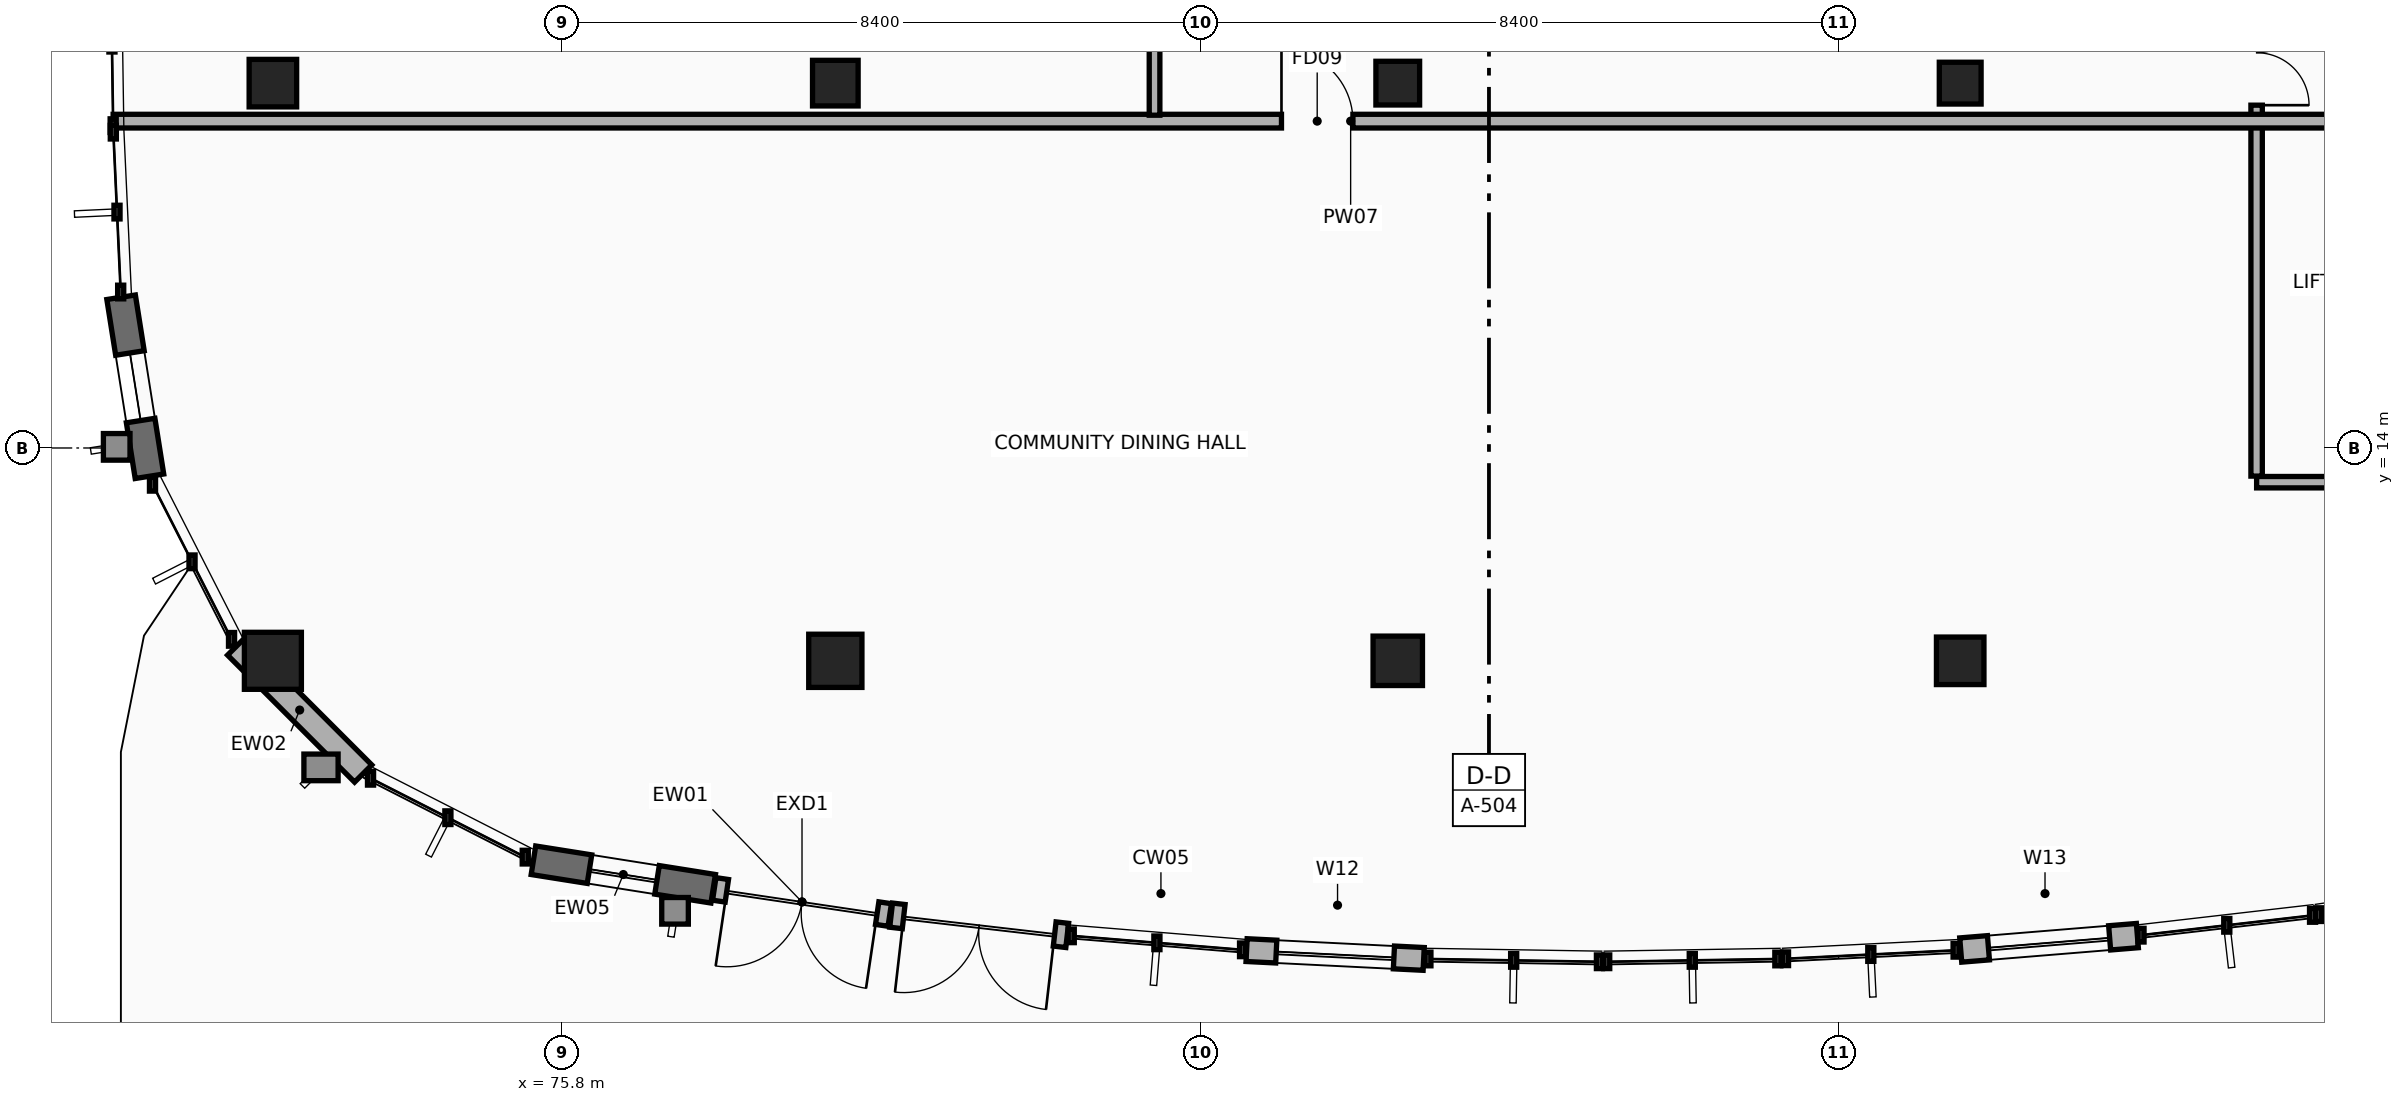
"""IFC4 building model, lengths in metres.
Left out: names, types, materials, properties, quantities, classifications, styles, units other than length and angle.
Written with IfcOpenShell. Run it as: python <this file> out.ifc"""

import sys

from ifc_helpers import new_model, si_unit, direction, frame, frame_2d, origin, origin_2d, place, context, subcontext, project, spatial, rectangle, extrude, element, fill, save


model = new_model("IFC4")
c1 = context("Model", 3, precision=1e-05, world=origin(), true_north=direction((0.0, 1.0)))
c2 = subcontext(c1, "Body", "Model", "MODEL_VIEW")
j1 = project(units=[si_unit("LENGTHUNIT", "METRE"), si_unit("PLANEANGLEUNIT", "RADIAN")], contexts=[c1])
p1 = place(None, origin())
s1 = spatial("IfcSite", under=j1, at=p1, CompositionType="ELEMENT")
p2 = place(p1, origin())
s2 = spatial("IfcBuilding", under=s1, at=p2, CompositionType="ELEMENT")
p3 = place(p2, origin())
s3 = spatial("IfcBuildingStorey", under=s2, at=p3, CompositionType="ELEMENT", Elevation=0.0)
p4 = place(p3, frame((72.0, 11.2, 0.0), z_axis=(0.0, 0.0, 1.0), x_axis=(1.0, 0.0, 0.0)))
e1 = element("IfcColumn", 1, at=p4, inside=s3, PredefinedType="COLUMN", context=c2, shape_type="SweptSolid", body=[
    extrude(rectangle(XDim=0.75, YDim=0.75, at=origin_2d()), origin(), (0.0, 0.0, 1.0), 4.8),
])
p5 = place(p3, frame((72.0, 18.8, 0.0), z_axis=(0.0, 0.0, 1.0), x_axis=(1.0, 0.0, 0.0)))
e2 = element("IfcColumn", 2, at=p5, inside=s3, PredefinedType="COLUMN", context=c2, shape_type="SweptSolid", body=[
    extrude(rectangle(XDim=0.625, YDim=0.625, at=origin_2d()), origin(), (0.0, 0.0, 1.0), 4.8),
])
p6 = place(p3, frame((79.4, 11.2, 0.0), z_axis=(0.0, 0.0, 1.0), x_axis=(1.0, 0.0, 0.0)))
e3 = element("IfcColumn", 3, at=p6, inside=s3, PredefinedType="COLUMN", context=c2, shape_type="SweptSolid", body=[
    extrude(rectangle(XDim=0.7, YDim=0.7, at=origin_2d()), origin(), (0.0, 0.0, 1.0), 4.8),
])
p7 = place(p3, frame((79.4, 18.8, 0.0), z_axis=(0.0, 0.0, 1.0), x_axis=(1.0, 0.0, 0.0)))
e4 = element("IfcColumn", 4, at=p7, inside=s3, PredefinedType="COLUMN", context=c2, shape_type="SweptSolid", body=[
    extrude(rectangle(XDim=0.6, YDim=0.6, at=origin_2d()), origin(), (0.0, 0.0, 1.0), 4.8),
])
p8 = place(p3, frame((86.8, 11.2, 0.0), z_axis=(0.0, 0.0, 1.0), x_axis=(1.0, 0.0, 0.0)))
e5 = element("IfcColumn", 5, at=p8, inside=s3, PredefinedType="COLUMN", context=c2, shape_type="SweptSolid", body=[
    extrude(rectangle(XDim=0.65, YDim=0.65, at=origin_2d()), origin(), (0.0, 0.0, 1.0), 4.8),
])
p9 = place(p3, frame((86.8, 18.8, 0.0), z_axis=(0.0, 0.0, 1.0), x_axis=(1.0, 0.0, 0.0)))
e6 = element("IfcColumn", 6, at=p9, inside=s3, PredefinedType="COLUMN", context=c2, shape_type="SweptSolid", body=[
    extrude(rectangle(XDim=0.575, YDim=0.575, at=origin_2d()), origin(), (0.0, 0.0, 1.0), 4.8),
])
p10 = place(p3, frame((94.2, 11.2, 0.0), z_axis=(0.0, 0.0, 1.0), x_axis=(1.0, 0.0, 0.0)))
e7 = element("IfcColumn", 7, at=p10, inside=s3, PredefinedType="COLUMN", context=c2, shape_type="SweptSolid", body=[
    extrude(rectangle(XDim=0.625, YDim=0.625, at=origin_2d()), origin(), (0.0, 0.0, 1.0), 4.8),
])
p11 = place(p3, frame((94.2, 18.8, 0.0), z_axis=(0.0, 0.0, 1.0), x_axis=(1.0, 0.0, 0.0)))
e8 = element("IfcColumn", 8, at=p11, inside=s3, PredefinedType="COLUMN", context=c2, shape_type="SweptSolid", body=[
    extrude(rectangle(XDim=0.55, YDim=0.55, at=origin_2d()), origin(), (0.0, 0.0, 1.0), 4.8),
])
p12 = place(p3, frame((80.116, 7.856, 0.0), z_axis=(0.0, 0.0, 1.0), x_axis=(-0.98914554884, 0.1469390459, 0.0)))
e9 = element("IfcWall", 9, at=p12, inside=s3, PredefinedType="STANDARD", context=c2, shape_type="SweptSolid", body=[
    extrude(rectangle(XDim=2.334, YDim=0.3, at=frame_2d((1.167, 0.0))), origin(), (0.0, 0.0, 1.0), 4.512),
])
p13 = place(p12, frame((0.167, 0.0, 0.0)))
e10 = element("IfcOpeningElement", 10, at=p13, cuts=e9, PredefinedType="OPENING", context=c2, shape_type="SweptSolid", body=[
    extrude(rectangle(XDim=2.0, YDim=2.4, at=frame_2d((1.0, 1.2))), frame((0.0, 0.16, 0.0), z_axis=(0.0, -1.0, 0.0), x_axis=(1.0, 0.0, 0.0)), (0.0, 0.0, 1.0), 0.32),
])
p14 = place(p3, frame((82.451, 7.587, 0.0), z_axis=(0.0, 0.0, 1.0), x_axis=(-0.993420850358, 0.114520801927, 0.0)))
e11 = element("IfcWall", 11, at=p14, inside=s3, PredefinedType="STANDARD", context=c2, shape_type="SweptSolid", body=[
    extrude(rectangle(XDim=2.332, YDim=0.32, at=frame_2d((1.166, 0.0))), origin(), (0.0, 0.0, 1.0), 4.512),
])
p15 = place(p14, frame((0.166, 0.0, 0.0)))
e12 = element("IfcOpeningElement", 12, at=p15, cuts=e11, PredefinedType="OPENING", context=c2, shape_type="SweptSolid", body=[
    extrude(rectangle(XDim=2.0, YDim=2.4, at=frame_2d((1.0, 1.2))), frame((0.0, 0.17, 0.0), z_axis=(0.0, -1.0, 0.0), x_axis=(1.0, 0.0, 0.0)), (0.0, 0.0, 1.0), 0.34),
])
p16 = place(p3, frame((87.141, 7.278, 0.0), z_axis=(0.0, 0.0, 1.0), x_axis=(-0.998763795086, 0.049707963398, 0.0)))
e13 = element("IfcWall", 13, at=p16, inside=s3, PredefinedType="STANDARD", context=c2, shape_type="SweptSolid", body=[
    extrude(rectangle(XDim=2.333, YDim=0.3, at=frame_2d((1.167, 0.0))), origin(), (0.0, 0.0, 1.0), 4.512),
])
p17 = place(p16, frame((0.392, 0.0, 0.9)))
e14 = element("IfcOpeningElement", 14, at=p17, cuts=e13, PredefinedType="OPENING", context=c2, shape_type="SweptSolid", body=[
    extrude(rectangle(XDim=1.55, YDim=1.65, at=frame_2d((0.775, 0.825))), frame((0.0, 0.16, 0.0), z_axis=(0.0, -1.0, 0.0), x_axis=(1.0, 0.0, 0.0)), (0.0, 0.0, 1.0), 0.32),
])
p18 = place(p3, frame((96.531, 7.585, 0.0), z_axis=(0.0, 0.0, 1.0), x_axis=(-0.996676640199, -0.081459651862, 0.0)))
e15 = element("IfcWall", 15, at=p18, inside=s3, PredefinedType="STANDARD", context=c2, shape_type="SweptSolid", body=[
    extrude(rectangle(XDim=2.332, YDim=0.32, at=frame_2d((1.166, 0.0))), origin(), (0.0, 0.0, 1.0), 4.512),
])
p19 = place(p18, frame((0.366, 0.0, 0.9)))
e16 = element("IfcOpeningElement", 16, at=p19, cuts=e15, PredefinedType="OPENING", context=c2, shape_type="SweptSolid", body=[
    extrude(rectangle(XDim=1.6, YDim=1.5, at=frame_2d((0.8, 0.75))), frame((0.0, 0.17, 0.0), z_axis=(0.0, -1.0, 0.0), x_axis=(1.0, 0.0, 0.0)), (0.0, 0.0, 1.0), 0.34),
])
p20 = place(p3, frame((70.376, 13.628, 0.0), z_axis=(0.0, 0.0, 1.0), x_axis=(-0.156456808689, 0.98768480145, 0.0)))
e17 = element("IfcWall", 17, at=p20, inside=s3, PredefinedType="STANDARD", context=c2, shape_type="SweptSolid", body=[
    extrude(rectangle(XDim=2.384, YDim=0.38, at=frame_2d((1.192, 0.0))), origin(), (0.0, 0.0, 1.0), 4.512),
])
p21 = place(p20, frame((0.742, 0.0, 0.9)))
e18 = element("IfcOpeningElement", 18, at=p21, cuts=e17, PredefinedType="OPENING", context=c2, shape_type="SweptSolid", body=[
    extrude(rectangle(XDim=0.9, YDim=1.2, at=frame_2d((0.45, 0.6))), frame((0.0, 0.2, 0.0), z_axis=(0.0, -1.0, 0.0), x_axis=(1.0, 0.0, 0.0)), (0.0, 0.0, 1.0), 0.4),
])
p22 = place(p3, frame((73.188, 9.717, 0.0), z_axis=(0.0, 0.0, 1.0), x_axis=(-0.707106781187, 0.707106781187, 0.0)))
e19 = element("IfcWall", 19, at=p22, inside=s3, PredefinedType="STANDARD", context=c2, shape_type="SweptSolid", body=[
    extrude(rectangle(XDim=2.363, YDim=0.32, at=frame_2d((1.182, 0.0))), origin(), (0.0, 0.0, 1.0), 4.03),
])
p23 = place(p3, frame((77.793, 8.201, 0.0), z_axis=(0.0, 0.0, 1.0), x_axis=(-0.987661073589, 0.15660652514, 0.0)))
e20 = element("IfcWall", 20, at=p23, inside=s3, PredefinedType="STANDARD", context=c2, shape_type="SweptSolid", body=[
    extrude(rectangle(XDim=2.395, YDim=0.38, at=frame_2d((1.197, 0.0))), origin(), (0.0, 0.0, 1.0), 4.512),
])
p24 = place(p23, frame((0.748, 0.0, 0.9)))
e21 = element("IfcOpeningElement", 21, at=p24, cuts=e20, PredefinedType="OPENING", context=c2, shape_type="SweptSolid", body=[
    extrude(rectangle(XDim=0.9, YDim=1.2, at=frame_2d((0.45, 0.6))), frame((0.0, 0.2, 0.0), z_axis=(0.0, -1.0, 0.0), x_axis=(1.0, 0.0, 0.0)), (0.0, 0.0, 1.0), 0.4),
])
p25 = place(p3, frame((98.1, 13.55, 0.0), z_axis=(0.0, 0.0, 1.0), x_axis=(1.0, 0.0, 0.0)))
e22 = element("IfcWall", 22, at=p25, inside=s3, PredefinedType="PARTITIONING", context=c2, shape_type="SweptSolid", body=[
    extrude(rectangle(XDim=4.365, YDim=0.15, at=frame_2d((2.183, 0.0))), origin(), (0.0, 0.0, 1.0), 3.93),
])
p26 = place(p3, frame((98.1, 24.77, 0.0), z_axis=(0.0, 0.0, 1.0), x_axis=(0.0, -1.0, 0.0)))
e23 = element("IfcWall", 23, at=p26, inside=s3, PredefinedType="PARTITIONING", context=c2, shape_type="SweptSolid", body=[
    extrude(rectangle(XDim=11.14, YDim=0.15, at=frame_2d((5.57, 0.0))), origin(), (0.0, 0.0, 1.0), 4.117),
])
p27 = place(p26, frame((4.88, 0.0, 0.0)))
e24 = element("IfcOpeningElement", 24, at=p27, cuts=e23, PredefinedType="OPENING", context=c2, shape_type="SweptSolid", body=[
    extrude(rectangle(XDim=1.38, YDim=2.2, at=frame_2d((0.69, 1.1))), frame((0.0, 0.085, 0.0), z_axis=(0.0, -1.0, 0.0), x_axis=(1.0, 0.0, 0.0)), (0.0, 0.0, 1.0), 0.17),
])
p28 = place(p3, frame((69.898, 18.3, 0.0), z_axis=(0.0, 0.0, 1.0), x_axis=(1.0, 0.0, 0.0)))
e25 = element("IfcWall", 25, at=p28, inside=s3, PredefinedType="PARTITIONING", context=c2, shape_type="SweptSolid", body=[
    extrude(rectangle(XDim=32.564, YDim=0.18, at=frame_2d((16.282, 0.0))), origin(), (0.0, 0.0, 1.0), 3.93),
])
p29 = place(p28, frame((15.372, 0.0, 0.0)))
e26 = element("IfcOpeningElement", 26, at=p29, cuts=e25, PredefinedType="OPENING", context=c2, shape_type="SweptSolid", body=[
    extrude(rectangle(XDim=0.94, YDim=2.1, at=frame_2d((0.47, 1.05))), frame((0.0, 0.1, 0.0), z_axis=(0.0, -1.0, 0.0), x_axis=(1.0, 0.0, 0.0)), (0.0, 0.0, 1.0), 0.2),
])
p30 = place(p3, frame((83.6, 18.378, 0.0), z_axis=(0.0, 0.0, 1.0), x_axis=(0.0, 1.0, 0.0)))
e27 = element("IfcWall", 27, at=p30, inside=s3, PredefinedType="PARTITIONING", context=c2, shape_type="SweptSolid", body=[
    extrude(rectangle(XDim=14.781, YDim=0.14, at=frame_2d((7.391, 0.0))), origin(), (0.0, 0.0, 1.0), 4.112),
])
p31 = place(p13, origin())
e28 = element("IfcDoor", 28, at=p31, inside=s3, OperationType="DOUBLE_DOOR_SINGLE_SWING", PredefinedType="DOOR", context=c2, shape_type="SweptSolid", body=[
    extrude(rectangle(XDim=2.0, YDim=2.4, at=frame_2d((1.0, 1.2))), frame((0.0, 0.025, 0.0), z_axis=(0.0, -1.0, 0.0), x_axis=(1.0, 0.0, 0.0)), (0.0, 0.0, 1.0), 0.05),
])
fill(e10, e28)
p32 = place(p15, origin())
e29 = element("IfcDoor", 29, at=p32, inside=s3, OperationType="DOUBLE_DOOR_SINGLE_SWING", PredefinedType="DOOR", context=c2, shape_type="SweptSolid", body=[
    extrude(rectangle(XDim=2.0, YDim=2.4, at=frame_2d((1.0, 1.2))), frame((0.0, 0.025, 0.0), z_axis=(0.0, -1.0, 0.0), x_axis=(1.0, 0.0, 0.0)), (0.0, 0.0, 1.0), 0.05),
])
fill(e12, e29)
p33 = place(p17, origin())
e30 = element("IfcWindow", 30, at=p33, inside=s3, PartitioningType="SINGLE_PANEL", PredefinedType="WINDOW", context=c2, shape_type="SweptSolid", body=[
    extrude(rectangle(XDim=1.55, YDim=1.65, at=frame_2d((0.775, 0.825))), frame((0.0, 0.03, 0.0), z_axis=(0.0, -1.0, 0.0), x_axis=(1.0, 0.0, 0.0)), (0.0, 0.0, 1.0), 0.06),
])
fill(e14, e30)
p34 = place(p19, origin())
e31 = element("IfcWindow", 31, at=p34, inside=s3, PartitioningType="SINGLE_PANEL", PredefinedType="WINDOW", context=c2, shape_type="SweptSolid", body=[
    extrude(rectangle(XDim=1.6, YDim=1.5, at=frame_2d((0.8, 0.75))), frame((0.0, 0.03, 0.0), z_axis=(0.0, -1.0, 0.0), x_axis=(1.0, 0.0, 0.0)), (0.0, 0.0, 1.0), 0.06),
])
fill(e16, e31)
p35 = place(p21, origin())
e32 = element("IfcWindow", 32, at=p35, inside=s3, PartitioningType="SINGLE_PANEL", PredefinedType="WINDOW", context=c2, shape_type="SweptSolid", body=[
    extrude(rectangle(XDim=0.9, YDim=1.2, at=frame_2d((0.45, 0.6))), frame((0.0, 0.03, 0.0), z_axis=(0.0, -1.0, 0.0), x_axis=(1.0, 0.0, 0.0)), (0.0, 0.0, 1.0), 0.06),
])
fill(e18, e32)
p36 = place(p24, origin())
e33 = element("IfcWindow", 33, at=p36, inside=s3, PartitioningType="SINGLE_PANEL", PredefinedType="WINDOW", context=c2, shape_type="SweptSolid", body=[
    extrude(rectangle(XDim=0.9, YDim=1.2, at=frame_2d((0.45, 0.6))), frame((0.0, 0.03, 0.0), z_axis=(0.0, -1.0, 0.0), x_axis=(1.0, 0.0, 0.0)), (0.0, 0.0, 1.0), 0.06),
])
fill(e21, e33)
p37 = place(p27, origin())
e34 = element("IfcDoor", 34, at=p37, inside=s3, OperationType="DOUBLE_DOOR_SINGLE_SWING", PredefinedType="DOOR", context=c2, shape_type="SweptSolid", body=[
    extrude(rectangle(XDim=1.38, YDim=2.2, at=frame_2d((0.69, 1.1))), frame((0.0, 0.025, 0.0), z_axis=(0.0, -1.0, 0.0), x_axis=(1.0, 0.0, 0.0)), (0.0, 0.0, 1.0), 0.05),
])
fill(e24, e34)
p38 = place(p29, origin())
e35 = element("IfcDoor", 35, at=p38, inside=s3, OperationType="SINGLE_SWING_LEFT", PredefinedType="DOOR", context=c2, shape_type="SweptSolid", body=[
    extrude(rectangle(XDim=0.94, YDim=2.1, at=frame_2d((0.47, 1.05))), frame((0.0, 0.025, 0.0), z_axis=(0.0, -1.0, 0.0), x_axis=(1.0, 0.0, 0.0)), (0.0, 0.0, 1.0), 0.05),
])
fill(e26, e35)
save(model, sys.argv[1])
